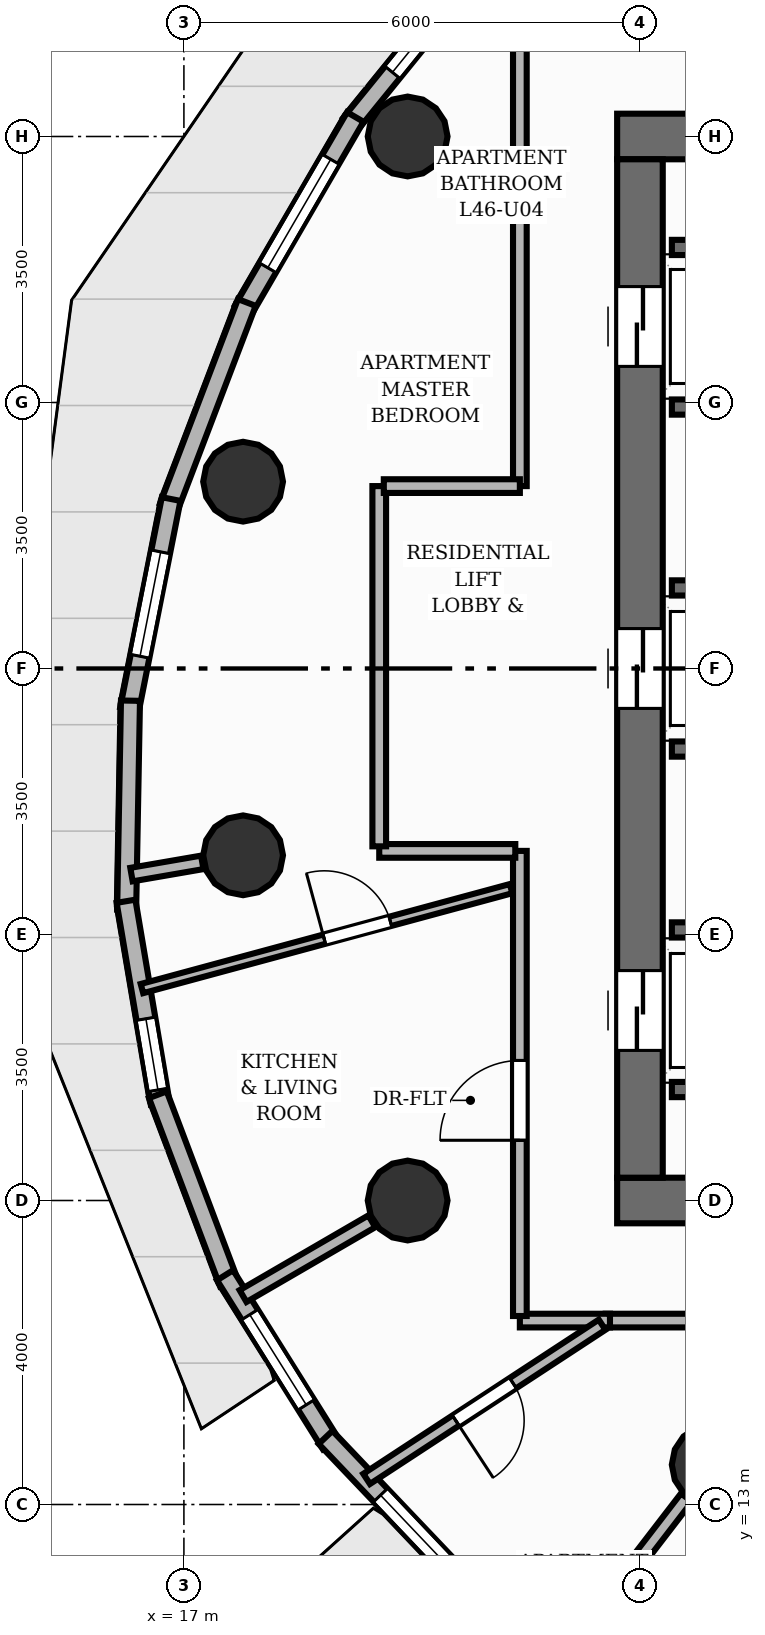
"""IFC4 building model, lengths in metres.
Left out: names, types, materials, properties, quantities, classifications, styles, units other than length and angle.
Written with IfcOpenShell. Run it as: python <this file> out.ifc"""

import sys

from ifc_helpers import new_model, si_unit, direction, frame, frame_2d, origin, origin_2d, place, context, subcontext, project, spatial, rectangle, circle, extrude, element, fill, save


model = new_model("IFC4")
c1 = context("Model", 3, precision=1e-05, world=origin(), true_north=direction((0.0, 1.0)))
c2 = subcontext(c1, "Body", "Model", "MODEL_VIEW")
j1 = project(units=[si_unit("LENGTHUNIT", "METRE"), si_unit("PLANEANGLEUNIT", "RADIAN")], contexts=[c1])
p1 = place(None, origin())
s1 = spatial("IfcSite", under=j1, at=p1, CompositionType="ELEMENT")
p2 = place(p1, origin())
s2 = spatial("IfcBuilding", under=s1, at=p2, CompositionType="ELEMENT")
p3 = place(p2, frame((0.0, 0.0, 155.36)))
s3 = spatial("IfcBuildingStorey", under=s2, at=p3, CompositionType="ELEMENT", Elevation=155.36)
p4 = place(p3, frame((22.7, 17.0, 0.0), z_axis=(0.0, 0.0, 1.0), x_axis=(1.0, 0.0, 0.0)))
e1 = element("IfcWall", 1, at=p4, inside=s3, PredefinedType="SHEAR", context=c2, shape_type="SweptSolid", body=[
    extrude(rectangle(XDim=15.1, YDim=0.6, at=frame_2d((7.55, 0.0))), origin(), (0.0, 0.0, 1.0), 3.2),
])
p5 = place(p4, frame((5.8, 0.0, 0.0)))
e2 = element("IfcOpeningElement", 2, at=p5, cuts=e1, PredefinedType="OPENING", context=c2, shape_type="SweptSolid", body=[
    extrude(rectangle(XDim=1.1, YDim=2.15, at=frame_2d((0.55, 1.075))), frame((0.0, 0.31, 0.0), z_axis=(0.0, -1.0, 0.0), x_axis=(1.0, 0.0, 0.0)), (0.0, 0.0, 1.0), 0.62),
])
p6 = place(p4, frame((9.35, 0.0, 0.0)))
e3 = element("IfcOpeningElement", 3, at=p6, cuts=e1, PredefinedType="OPENING", context=c2, shape_type="SweptSolid", body=[
    extrude(rectangle(XDim=0.9, YDim=2.1, at=frame_2d((0.45, 1.05))), frame((0.0, 0.31, 0.0), z_axis=(0.0, -1.0, 0.0), x_axis=(1.0, 0.0, 0.0)), (0.0, 0.0, 1.0), 0.62),
])
p7 = place(p3, frame((22.7, 31.0, 0.0), z_axis=(0.0, 0.0, 1.0), x_axis=(1.0, 0.0, 0.0)))
e4 = element("IfcWall", 4, at=p7, inside=s3, PredefinedType="SHEAR", context=c2, shape_type="SweptSolid", body=[
    extrude(rectangle(XDim=15.1, YDim=0.6, at=frame_2d((7.55, 0.0))), origin(), (0.0, 0.0, 1.0), 3.2),
])
p8 = place(p7, frame((11.7, 0.0, 0.0)))
e5 = element("IfcOpeningElement", 5, at=p8, cuts=e4, PredefinedType="OPENING", context=c2, shape_type="SweptSolid", body=[
    extrude(rectangle(XDim=1.1, YDim=2.15, at=frame_2d((0.55, 1.075))), frame((0.0, 0.31, 0.0), z_axis=(0.0, -1.0, 0.0), x_axis=(1.0, 0.0, 0.0)), (0.0, 0.0, 1.0), 0.62),
])
p9 = place(p3, frame((23.0, 17.3, 0.0), z_axis=(0.0, 0.0, 1.0), x_axis=(0.0, 1.0, 0.0)))
e6 = element("IfcWall", 6, at=p9, inside=s3, PredefinedType="SHEAR", context=c2, shape_type="SweptSolid", body=[
    extrude(rectangle(XDim=13.4, YDim=0.6, at=frame_2d((6.7, 0.0))), origin(), (0.0, 0.0, 1.0), 3.2),
])
p10 = place(p9, frame((1.675, 0.0, 0.0)))
e7 = element("IfcOpeningElement", 7, at=p10, cuts=e6, PredefinedType="OPENING", context=c2, shape_type="SweptSolid", body=[
    extrude(rectangle(XDim=1.05, YDim=2.15, at=frame_2d((0.525, 1.075))), frame((0.0, 0.31, 0.0), z_axis=(0.0, -1.0, 0.0), x_axis=(1.0, 0.0, 0.0)), (0.0, 0.0, 1.0), 0.62),
])
p11 = place(p9, frame((6.175, 0.0, 0.0)))
e8 = element("IfcOpeningElement", 8, at=p11, cuts=e6, PredefinedType="OPENING", context=c2, shape_type="SweptSolid", body=[
    extrude(rectangle(XDim=1.05, YDim=2.15, at=frame_2d((0.525, 1.075))), frame((0.0, 0.31, 0.0), z_axis=(0.0, -1.0, 0.0), x_axis=(1.0, 0.0, 0.0)), (0.0, 0.0, 1.0), 0.62),
])
p12 = place(p9, frame((10.675, 0.0, 0.0)))
e9 = element("IfcOpeningElement", 9, at=p12, cuts=e6, PredefinedType="OPENING", context=c2, shape_type="SweptSolid", body=[
    extrude(rectangle(XDim=1.05, YDim=2.15, at=frame_2d((0.525, 1.075))), frame((0.0, 0.31, 0.0), z_axis=(0.0, -1.0, 0.0), x_axis=(1.0, 0.0, 0.0)), (0.0, 0.0, 1.0), 0.62),
])
for number, where, z_axis, x_axis in (
    (10, (19.944, 31.0, 0.0), (0.0, 0.0, 1.0), (1.0, 0.0, 0.0)),
    (11, (17.779, 26.458, 0.0), (0.0, 0.0, 1.0), (1.0, 0.0, 0.0)),
    (12, (17.779, 21.542, 0.0), (0.0, 0.0, 1.0), (1.0, 0.0, 0.0)),
    (13, (19.944, 17.0, 0.0), (0.0, 0.0, 1.0), (1.0, 0.0, 0.0)),
    (14, (23.944, 13.523, 0.0), (0.0, 0.0, 1.0), (1.0, 0.0, 0.0)),
):
    element("IfcColumn", number, at=place(p3, frame(where, z_axis=z_axis, x_axis=x_axis)), inside=s3, PredefinedType="COLUMN", context=c2, shape_type="SweptSolid", body=[
        extrude(circle(Radius=0.525, at=origin_2d()), origin(), (0.0, 0.0, 1.0), 3.2),
    ])
p13 = place(p3, frame((19.193, 31.167, 0.0), z_axis=(0.0, 0.0, 1.0), x_axis=(0.630478385784, 0.776206805599, 0.0)))
e15 = element("IfcWall", 15, at=p13, inside=s3, PredefinedType="SOLIDWALL", context=c2, shape_type="SweptSolid", body=[
    extrude(rectangle(XDim=2.977, YDim=0.25, at=frame_2d((1.489, 0.0))), origin(), (0.0, 0.0, 1.0), 2.8),
])
p14 = place(p13, frame((0.873, 0.0, 0.85)))
e16 = element("IfcOpeningElement", 16, at=p14, cuts=e15, PredefinedType="OPENING", context=c2, shape_type="SweptSolid", body=[
    extrude(rectangle(XDim=1.65, YDim=1.55, at=frame_2d((0.825, 0.775))), frame((0.0, 0.135, 0.0), z_axis=(0.0, -1.0, 0.0), x_axis=(1.0, 0.0, 0.0)), (0.0, 0.0, 1.0), 0.27),
])
p15 = place(p3, frame((17.781, 28.717, 0.0), z_axis=(0.0, 0.0, 1.0), x_axis=(0.502009170613, 0.864862296912, 0.0)))
e17 = element("IfcWall", 17, at=p15, inside=s3, PredefinedType="SOLIDWALL", context=c2, shape_type="SweptSolid", body=[
    extrude(rectangle(XDim=2.937, YDim=0.25, at=frame_2d((1.469, 0.0))), origin(), (0.0, 0.0, 1.0), 2.8),
])
p16 = place(p15, frame((0.643, 0.0, 0.85)))
e18 = element("IfcOpeningElement", 18, at=p16, cuts=e17, PredefinedType="OPENING", context=c2, shape_type="SweptSolid", body=[
    extrude(rectangle(XDim=1.65, YDim=1.55, at=frame_2d((0.825, 0.775))), frame((0.0, 0.135, 0.0), z_axis=(0.0, -1.0, 0.0), x_axis=(1.0, 0.0, 0.0)), (0.0, 0.0, 1.0), 0.27),
])
p17 = place(p3, frame((16.802, 26.123, 0.0), z_axis=(0.0, 0.0, 1.0), x_axis=(0.356178525313, 0.934417924756, 0.0)))
e19 = element("IfcWall", 19, at=p17, inside=s3, PredefinedType="SOLIDWALL", context=c2, shape_type="SweptSolid", body=[
    extrude(rectangle(XDim=2.882, YDim=0.25, at=frame_2d((1.441, 0.0))), origin(), (0.0, 0.0, 1.0), 2.8),
])
p18 = place(p3, frame((16.285, 23.466, 0.0), z_axis=(0.0, 0.0, 1.0), x_axis=(0.194099406303, 0.980981865517, 0.0)))
e20 = element("IfcWall", 20, at=p18, inside=s3, PredefinedType="SOLIDWALL", context=c2, shape_type="SweptSolid", body=[
    extrude(rectangle(XDim=2.817, YDim=0.25, at=frame_2d((1.409, 0.0))), origin(), (0.0, 0.0, 1.0), 2.8),
])
p19 = place(p18, frame((0.709, 0.0, 0.85)))
e21 = element("IfcOpeningElement", 21, at=p19, cuts=e20, PredefinedType="OPENING", context=c2, shape_type="SweptSolid", body=[
    extrude(rectangle(XDim=1.4, YDim=1.55, at=frame_2d((0.7, 0.775))), frame((0.0, 0.135, 0.0), z_axis=(0.0, -1.0, 0.0), x_axis=(1.0, 0.0, 0.0)), (0.0, 0.0, 1.0), 0.27),
])
p20 = place(p3, frame((16.247, 20.825, 0.0), z_axis=(0.0, 0.0, 1.0), x_axis=(0.018273942119, 0.999833017578, 0.0)))
e22 = element("IfcWall", 22, at=p20, inside=s3, PredefinedType="SOLIDWALL", context=c2, shape_type="SweptSolid", body=[
    extrude(rectangle(XDim=2.752, YDim=0.25, at=frame_2d((1.376, 0.0))), origin(), (0.0, 0.0, 1.0), 2.8),
])
p21 = place(p3, frame((16.687, 18.282, 0.0), z_axis=(0.0, 0.0, 1.0), x_axis=(-0.166721354457, 0.9860040517, 0.0)))
e23 = element("IfcWall", 23, at=p21, inside=s3, PredefinedType="SOLIDWALL", context=c2, shape_type="SweptSolid", body=[
    extrude(rectangle(XDim=2.693, YDim=0.25, at=frame_2d((1.346, 0.0))), origin(), (0.0, 0.0, 1.0), 2.8),
])
p22 = place(p21, frame((0.175, 0.0, 0.85)))
e24 = element("IfcOpeningElement", 24, at=p22, cuts=e23, PredefinedType="OPENING", context=c2, shape_type="SweptSolid", body=[
    extrude(rectangle(XDim=0.95, YDim=1.45, at=frame_2d((0.475, 0.725))), frame((0.0, 0.135, 0.0), z_axis=(0.0, -1.0, 0.0), x_axis=(1.0, 0.0, 0.0)), (0.0, 0.0, 1.0), 0.27),
])
p23 = place(p3, frame((17.592, 15.914, 0.0), z_axis=(0.0, 0.0, 1.0), x_axis=(-0.353022229402, 0.93561493444, 0.0)))
e25 = element("IfcWall", 25, at=p23, inside=s3, PredefinedType="SOLIDWALL", context=c2, shape_type="SweptSolid", body=[
    extrude(rectangle(XDim=2.648, YDim=0.25, at=frame_2d((1.324, 0.0))), origin(), (0.0, 0.0, 1.0), 2.8),
])
p24 = place(p3, frame((18.934, 13.793, 0.0), z_axis=(0.0, 0.0, 1.0), x_axis=(-0.530726374543, 0.847543223302, 0.0)))
e26 = element("IfcWall", 26, at=p24, inside=s3, PredefinedType="SOLIDWALL", context=c2, shape_type="SweptSolid", body=[
    extrude(rectangle(XDim=2.624, YDim=0.25, at=frame_2d((1.312, 0.0))), origin(), (0.0, 0.0, 1.0), 2.8),
])
p25 = place(p24, frame((0.612, 0.0, 0.85)))
e27 = element("IfcOpeningElement", 27, at=p25, cuts=e26, PredefinedType="OPENING", context=c2, shape_type="SweptSolid", body=[
    extrude(rectangle(XDim=1.4, YDim=1.29, at=frame_2d((0.7, 0.645))), frame((0.0, 0.135, 0.0), z_axis=(0.0, -1.0, 0.0), x_axis=(1.0, 0.0, 0.0)), (0.0, 0.0, 1.0), 0.27),
])
p26 = place(p3, frame((20.672, 11.981, 0.0), z_axis=(0.0, 0.0, 1.0), x_axis=(-0.688923042016, 0.724834492957, 0.0)))
e28 = element("IfcWall", 28, at=p26, inside=s3, PredefinedType="SOLIDWALL", context=c2, shape_type="SweptSolid", body=[
    extrude(rectangle(XDim=2.624, YDim=0.25, at=frame_2d((1.312, 0.0))), origin(), (0.0, 0.0, 1.0), 2.8),
])
p27 = place(p26, frame((0.175, 0.0, 0.85)))
e29 = element("IfcOpeningElement", 29, at=p27, cuts=e28, PredefinedType="OPENING", context=c2, shape_type="SweptSolid", body=[
    extrude(rectangle(XDim=1.4, YDim=1.55, at=frame_2d((0.7, 0.775))), frame((0.0, 0.135, 0.0), z_axis=(0.0, -1.0, 0.0), x_axis=(1.0, 0.0, 0.0)), (0.0, 0.0, 1.0), 0.27),
])
for number, where, z_axis, x_axis in (
    (30, (23.42, 18.46, 0.0), (0.0, 0.0, 1.0), (1.0, 0.0, 0.0)),
    (31, (23.42, 29.54, 0.0), (0.0, 0.0, 1.0), (1.0, 0.0, 0.0)),
    (32, (23.42, 20.56, 0.0), (0.0, 0.0, 1.0), (1.0, 0.0, 0.0)),
    (33, (23.42, 22.94, 0.0), (0.0, 0.0, 1.0), (1.0, 0.0, 0.0)),
    (34, (23.42, 25.06, 0.0), (0.0, 0.0, 1.0), (1.0, 0.0, 0.0)),
    (35, (23.42, 27.44, 0.0), (0.0, 0.0, 1.0), (1.0, 0.0, 0.0)),
):
    element("IfcWall", number, at=place(p3, frame(where, z_axis=z_axis, x_axis=x_axis)), inside=s3, PredefinedType="SHEAR", context=c2, shape_type="SweptSolid", body=[
        extrude(rectangle(XDim=1.71, YDim=0.2, at=frame_2d((0.855, 0.0))), origin(), (0.0, 0.0, 1.0), 3.2),
    ])
p28 = place(p3, frame((17.242, 21.449, 0.0), z_axis=(0.0, 0.0, 1.0), x_axis=(-0.985363023372, -0.170469094476, 0.0)))
e36 = element("IfcWall", 36, at=p28, inside=s3, PredefinedType="PARTITIONING", context=c2, shape_type="SweptSolid", body=[
    extrude(rectangle(XDim=0.945, YDim=0.18, at=frame_2d((0.473, 0.0))), origin(), (0.0, 0.0, 1.0), 2.176),
])
p29 = place(p3, frame((19.472, 16.726, 0.0), z_axis=(0.0, 0.0, 1.0), x_axis=(-0.864794183852, -0.502126497584, 0.0)))
e37 = element("IfcWall", 37, at=p29, inside=s3, PredefinedType="PARTITIONING", context=c2, shape_type="SweptSolid", body=[
    extrude(rectangle(XDim=1.959, YDim=0.18, at=frame_2d((0.979, 0.0))), origin(), (0.0, 0.0, 1.0), 2.176),
])
p30 = place(p3, frame((23.612, 13.092, 0.0), z_axis=(0.0, 0.0, 1.0), x_axis=(-0.609529171404, -0.79276364019, 0.0)))
e38 = element("IfcWall", 38, at=p30, inside=s3, PredefinedType="PARTITIONING", context=c2, shape_type="SweptSolid", body=[
    extrude(rectangle(XDim=2.534, YDim=0.18, at=frame_2d((1.267, 0.0))), origin(), (0.0, 0.0, 1.0), 2.176),
])
p31 = place(p3, frame((39.08, 15.42, 0.0), z_axis=(0.0, 0.0, 1.0), x_axis=(-1.0, 0.0, 0.0)))
e39 = element("IfcWall", 39, at=p31, inside=s3, PredefinedType="PARTITIONING", context=c2, shape_type="SweptSolid", body=[
    extrude(rectangle(XDim=16.531, YDim=0.18, at=frame_2d((8.266, 0.0))), origin(), (0.0, 0.0, 1.0), 2.795),
])
p32 = place(p31, frame((6.994, 0.0, 0.0)))
e40 = element("IfcOpeningElement", 40, at=p32, cuts=e39, PredefinedType="OPENING", context=c2, shape_type="SweptSolid", body=[
    extrude(rectangle(XDim=1.05, YDim=2.15, at=frame_2d((0.525, 1.075))), frame((0.0, 0.1, 0.0), z_axis=(0.0, -1.0, 0.0), x_axis=(1.0, 0.0, 0.0)), (0.0, 0.0, 1.0), 0.2),
])
p33 = place(p3, frame((21.42, 26.4, 0.0), z_axis=(0.0, 0.0, 1.0), x_axis=(0.0, 1.0, 0.0)))
e41 = element("IfcWall", 41, at=p33, inside=s3, PredefinedType="PARTITIONING", context=c2, shape_type="SweptSolid", body=[
    extrude(rectangle(XDim=6.08, YDim=0.18, at=frame_2d((3.04, 0.0))), origin(), (0.0, 0.0, 1.0), 2.795),
])
p34 = place(p3, frame((22.606, 15.42, 0.0), z_axis=(0.0, 0.0, 1.0), x_axis=(-1.0, 0.0, 0.0)))
e42 = element("IfcWall", 42, at=p34, inside=s3, PredefinedType="PARTITIONING", context=c2, shape_type="SweptSolid", body=[
    extrude(rectangle(XDim=1.186, YDim=0.18, at=frame_2d((0.593, 0.0))), origin(), (0.0, 0.0, 1.0), 2.795),
])
p35 = place(p3, frame((21.42, 15.48, 0.0), z_axis=(0.0, 0.0, 1.0), x_axis=(0.0, 1.0, 0.0)))
e43 = element("IfcWall", 43, at=p35, inside=s3, PredefinedType="PARTITIONING", context=c2, shape_type="SweptSolid", body=[
    extrude(rectangle(XDim=6.12, YDim=0.18, at=frame_2d((3.06, 0.0))), origin(), (0.0, 0.0, 1.0), 2.795),
])
p36 = place(p35, frame((2.312, 0.0, 0.0)))
e44 = element("IfcOpeningElement", 44, at=p36, cuts=e43, PredefinedType="OPENING", context=c2, shape_type="SweptSolid", body=[
    extrude(rectangle(XDim=1.05, YDim=2.15, at=frame_2d((0.525, 1.075))), frame((0.0, 0.1, 0.0), z_axis=(0.0, -1.0, 0.0), x_axis=(1.0, 0.0, 0.0)), (0.0, 0.0, 1.0), 0.2),
])
p37 = place(p3, frame((21.36, 21.6, 0.0), z_axis=(0.0, 0.0, 1.0), x_axis=(-1.0, 0.0, 0.0)))
e45 = element("IfcWall", 45, at=p37, inside=s3, PredefinedType="PARTITIONING", context=c2, shape_type="SweptSolid", body=[
    extrude(rectangle(XDim=1.79, YDim=0.18, at=frame_2d((0.895, 0.0))), origin(), (0.0, 0.0, 1.0), 2.176),
])
p38 = place(p3, frame((19.57, 21.66, 0.0), z_axis=(0.0, 0.0, 1.0), x_axis=(0.0, 1.0, 0.0)))
e46 = element("IfcWall", 46, at=p38, inside=s3, PredefinedType="PARTITIONING", context=c2, shape_type="SweptSolid", body=[
    extrude(rectangle(XDim=4.74, YDim=0.18, at=frame_2d((2.37, 0.0))), origin(), (0.0, 0.0, 1.0), 2.795),
])
p39 = place(p3, frame((19.63, 26.4, 0.0), z_axis=(0.0, 0.0, 1.0), x_axis=(1.0, 0.0, 0.0)))
e47 = element("IfcWall", 47, at=p39, inside=s3, PredefinedType="PARTITIONING", context=c2, shape_type="SweptSolid", body=[
    extrude(rectangle(XDim=1.79, YDim=0.18, at=frame_2d((0.895, 0.0))), origin(), (0.0, 0.0, 1.0), 2.795),
])
p40 = place(p3, frame((21.333, 30.193, 0.0), z_axis=(0.0, 0.0, 1.0), x_axis=(-0.864719901707, 0.50225440923, 0.0)))
e48 = element("IfcWall", 48, at=p40, inside=s3, PredefinedType="PLUMBINGWALL", context=c2, shape_type="SweptSolid", body=[
    extrude(rectangle(XDim=1.09, YDim=0.16, at=frame_2d((0.545, 0.0))), origin(), (0.0, 0.0, 1.0), 2.176),
])
p41 = place(p3, frame((22.502, 15.365, 0.0), z_axis=(0.0, 0.0, 1.0), x_axis=(-0.836626802071, -0.547773305352, 0.0)))
e49 = element("IfcWall", 49, at=p41, inside=s3, PredefinedType="PLUMBINGWALL", context=c2, shape_type="SweptSolid", body=[
    extrude(rectangle(XDim=3.703, YDim=0.16, at=frame_2d((1.852, 0.0))), origin(), (0.0, 0.0, 1.0), 2.795),
])
p42 = place(p41, frame((1.401, 0.0, 0.0)))
e50 = element("IfcOpeningElement", 50, at=p42, cuts=e49, PredefinedType="OPENING", context=c2, shape_type="SweptSolid", body=[
    extrude(rectangle(XDim=0.9, YDim=2.1, at=frame_2d((0.45, 1.05))), frame((0.0, 0.09, 0.0), z_axis=(0.0, -1.0, 0.0), x_axis=(1.0, 0.0, 0.0)), (0.0, 0.0, 1.0), 0.18),
])
p43 = place(p3, frame((16.448, 19.788, 0.0), z_axis=(0.0, 0.0, 1.0), x_axis=(0.965231473287, 0.261396639182, 0.0)))
e51 = element("IfcWall", 51, at=p43, inside=s3, PredefinedType="PARTITIONING", context=c2, shape_type="SweptSolid", body=[
    extrude(rectangle(XDim=5.031, YDim=0.125, at=frame_2d((2.516, 0.0))), origin(), (0.0, 0.0, 1.0), 2.795),
])
p44 = place(p43, frame((2.486, 0.0, 0.0)))
e52 = element("IfcOpeningElement", 52, at=p44, cuts=e51, PredefinedType="OPENING", context=c2, shape_type="SweptSolid", body=[
    extrude(rectangle(XDim=0.9, YDim=2.1, at=frame_2d((0.45, 1.05))), frame((0.0, 0.073, 0.0), z_axis=(0.0, -1.0, 0.0), x_axis=(1.0, 0.0, 0.0)), (0.0, 0.0, 1.0), 0.145),
])
p45 = place(p14, origin())
e53 = element("IfcWindow", 53, at=p45, inside=s3, PartitioningType="SINGLE_PANEL", PredefinedType="WINDOW", context=c2, shape_type="SweptSolid", body=[
    extrude(rectangle(XDim=1.65, YDim=1.55, at=frame_2d((0.825, 0.775))), frame((0.0, 0.03, 0.0), z_axis=(0.0, -1.0, 0.0), x_axis=(1.0, 0.0, 0.0)), (0.0, 0.0, 1.0), 0.06),
])
fill(e16, e53)
p46 = place(p16, origin())
e54 = element("IfcWindow", 54, at=p46, inside=s3, PartitioningType="SINGLE_PANEL", PredefinedType="WINDOW", context=c2, shape_type="SweptSolid", body=[
    extrude(rectangle(XDim=1.65, YDim=1.55, at=frame_2d((0.825, 0.775))), frame((0.0, 0.03, 0.0), z_axis=(0.0, -1.0, 0.0), x_axis=(1.0, 0.0, 0.0)), (0.0, 0.0, 1.0), 0.06),
])
fill(e18, e54)
p47 = place(p19, origin())
e55 = element("IfcWindow", 55, at=p47, inside=s3, PartitioningType="SINGLE_PANEL", PredefinedType="WINDOW", context=c2, shape_type="SweptSolid", body=[
    extrude(rectangle(XDim=1.4, YDim=1.55, at=frame_2d((0.7, 0.775))), frame((0.0, 0.03, 0.0), z_axis=(0.0, -1.0, 0.0), x_axis=(1.0, 0.0, 0.0)), (0.0, 0.0, 1.0), 0.06),
])
fill(e21, e55)
p48 = place(p22, origin())
e56 = element("IfcWindow", 56, at=p48, inside=s3, PartitioningType="SINGLE_PANEL", PredefinedType="WINDOW", context=c2, shape_type="SweptSolid", body=[
    extrude(rectangle(XDim=0.95, YDim=1.45, at=frame_2d((0.475, 0.725))), frame((0.0, 0.03, 0.0), z_axis=(0.0, -1.0, 0.0), x_axis=(1.0, 0.0, 0.0)), (0.0, 0.0, 1.0), 0.06),
])
fill(e24, e56)
p49 = place(p25, origin())
e57 = element("IfcWindow", 57, at=p49, inside=s3, PartitioningType="SINGLE_PANEL", PredefinedType="WINDOW", context=c2, shape_type="SweptSolid", body=[
    extrude(rectangle(XDim=1.4, YDim=1.29, at=frame_2d((0.7, 0.645))), frame((0.0, 0.03, 0.0), z_axis=(0.0, -1.0, 0.0), x_axis=(1.0, 0.0, 0.0)), (0.0, 0.0, 1.0), 0.06),
])
fill(e27, e57)
p50 = place(p27, origin())
e58 = element("IfcWindow", 58, at=p50, inside=s3, PartitioningType="SINGLE_PANEL", PredefinedType="WINDOW", context=c2, shape_type="SweptSolid", body=[
    extrude(rectangle(XDim=1.4, YDim=1.55, at=frame_2d((0.7, 0.775))), frame((0.0, 0.03, 0.0), z_axis=(0.0, -1.0, 0.0), x_axis=(1.0, 0.0, 0.0)), (0.0, 0.0, 1.0), 0.06),
])
fill(e29, e58)
p51 = place(p10, origin())
e59 = element("IfcDoor", 59, at=p51, inside=s3, OperationType="DOUBLE_DOOR_SLIDING", PredefinedType="DOOR", context=c2, shape_type="SweptSolid", body=[
    extrude(rectangle(XDim=1.05, YDim=2.15, at=frame_2d((0.525, 1.075))), frame((0.0, 0.025, 0.0), z_axis=(0.0, -1.0, 0.0), x_axis=(1.0, 0.0, 0.0)), (0.0, 0.0, 1.0), 0.05),
])
fill(e7, e59)
p52 = place(p11, origin())
e60 = element("IfcDoor", 60, at=p52, inside=s3, OperationType="DOUBLE_DOOR_SLIDING", PredefinedType="DOOR", context=c2, shape_type="SweptSolid", body=[
    extrude(rectangle(XDim=1.05, YDim=2.15, at=frame_2d((0.525, 1.075))), frame((0.0, 0.025, 0.0), z_axis=(0.0, -1.0, 0.0), x_axis=(1.0, 0.0, 0.0)), (0.0, 0.0, 1.0), 0.05),
])
fill(e8, e60)
p53 = place(p12, origin())
e61 = element("IfcDoor", 61, at=p53, inside=s3, OperationType="DOUBLE_DOOR_SLIDING", PredefinedType="DOOR", context=c2, shape_type="SweptSolid", body=[
    extrude(rectangle(XDim=1.05, YDim=2.15, at=frame_2d((0.525, 1.075))), frame((0.0, 0.025, 0.0), z_axis=(0.0, -1.0, 0.0), x_axis=(1.0, 0.0, 0.0)), (0.0, 0.0, 1.0), 0.05),
])
fill(e9, e61)
p54 = place(p36, origin())
e62 = element("IfcDoor", 62, at=p54, inside=s3, OperationType="SINGLE_SWING_LEFT", PredefinedType="DOOR", context=c2, shape_type="SweptSolid", body=[
    extrude(rectangle(XDim=1.05, YDim=2.15, at=frame_2d((0.525, 1.075))), frame((0.0, 0.025, 0.0), z_axis=(0.0, -1.0, 0.0), x_axis=(1.0, 0.0, 0.0)), (0.0, 0.0, 1.0), 0.05),
])
fill(e44, e62)
p55 = place(p42, origin())
e63 = element("IfcDoor", 63, at=p55, inside=s3, OperationType="SINGLE_SWING_RIGHT", PredefinedType="DOOR", context=c2, shape_type="SweptSolid", body=[
    extrude(rectangle(XDim=0.9, YDim=2.1, at=frame_2d((0.45, 1.05))), frame((0.0, 0.025, 0.0), z_axis=(0.0, -1.0, 0.0), x_axis=(1.0, 0.0, 0.0)), (0.0, 0.0, 1.0), 0.05),
])
fill(e50, e63)
p56 = place(p44, origin())
e64 = element("IfcDoor", 64, at=p56, inside=s3, OperationType="SINGLE_SWING_LEFT", PredefinedType="DOOR", context=c2, shape_type="SweptSolid", body=[
    extrude(rectangle(XDim=0.9, YDim=2.1, at=frame_2d((0.45, 1.05))), frame((0.0, 0.025, 0.0), z_axis=(0.0, -1.0, 0.0), x_axis=(1.0, 0.0, 0.0)), (0.0, 0.0, 1.0), 0.05),
])
fill(e52, e64)
save(model, sys.argv[1])
